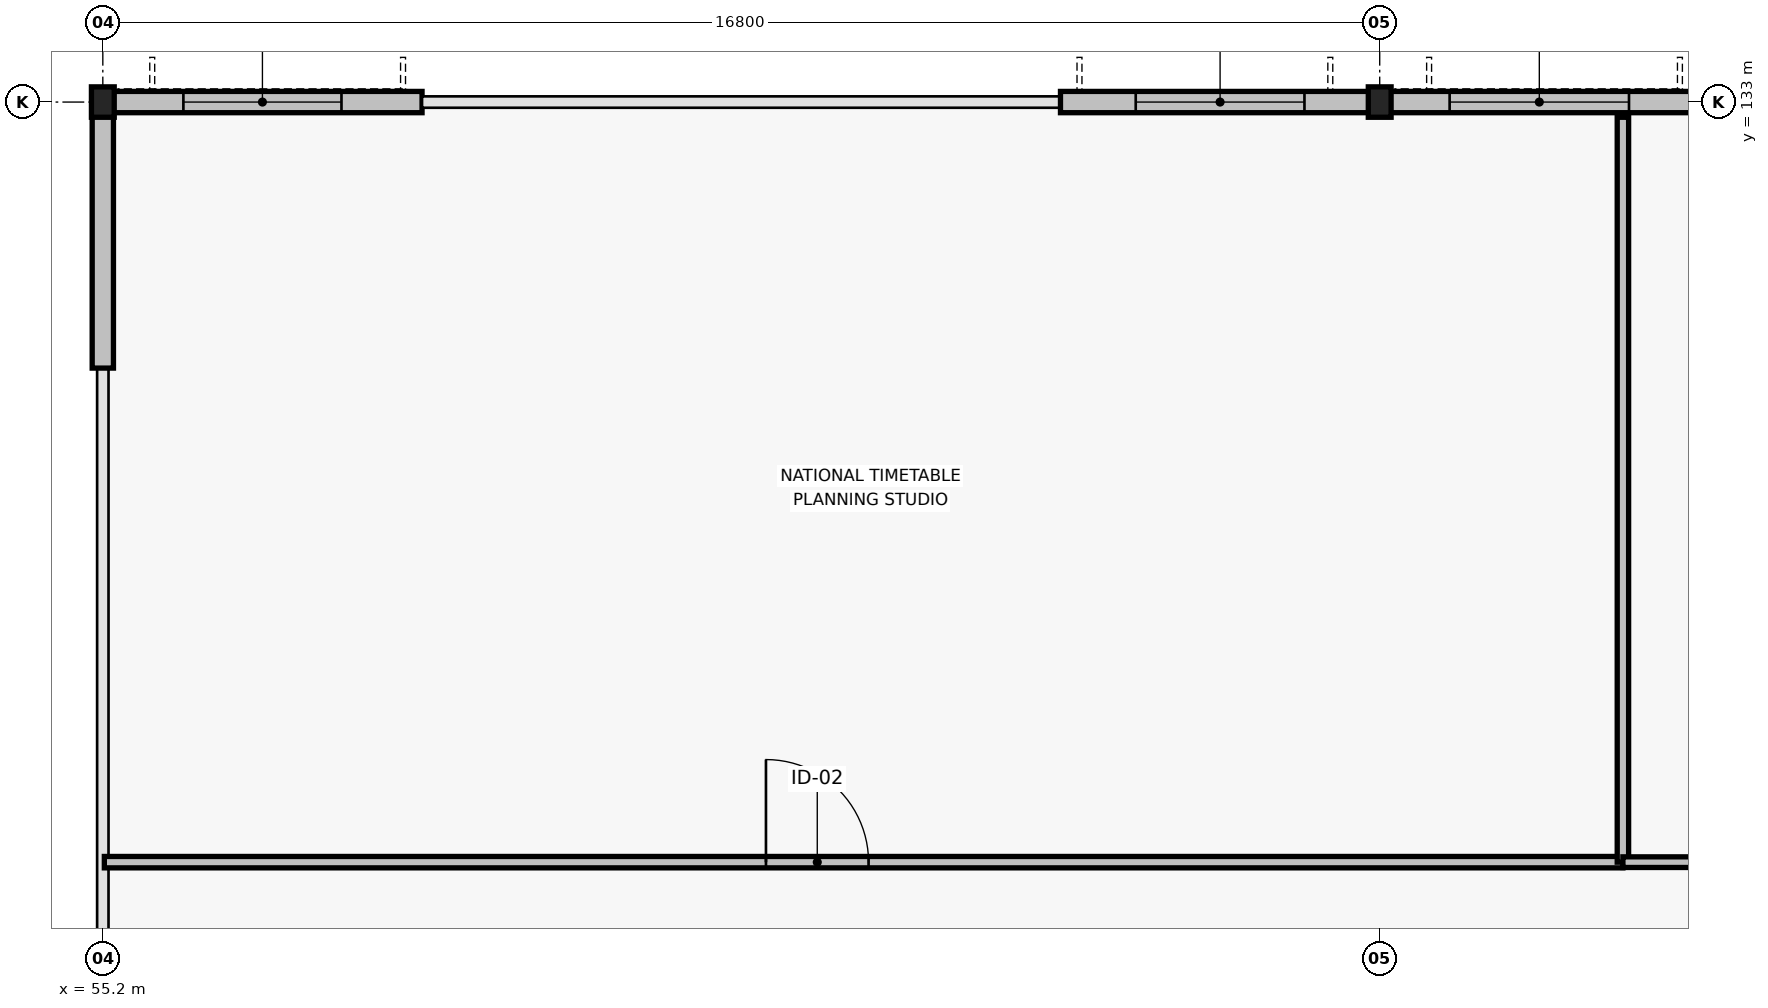
"""IFC4 building model, lengths in metres.
Left out: names, types, materials, properties, quantities, classifications, styles, units other than length and angle.
Written with IfcOpenShell. Run it as: python <this file> out.ifc"""

import sys

from ifc_helpers import new_model, si_unit, direction, frame, frame_2d, origin, origin_2d, place, context, subcontext, project, spatial, rectangle, i_section, extrude, element, fill, save


model = new_model("IFC4")
c1 = context("Model", 3, precision=1e-05, world=origin(), true_north=direction((0.0, 1.0)))
c2 = subcontext(c1, "Body", "Model", "MODEL_VIEW")
j1 = project(units=[si_unit("LENGTHUNIT", "METRE"), si_unit("PLANEANGLEUNIT", "RADIAN")], contexts=[c1])
p1 = place(None, origin())
s1 = spatial("IfcSite", under=j1, at=p1, CompositionType="ELEMENT")
p2 = place(p1, origin())
s2 = spatial("IfcBuilding", under=s1, at=p2, CompositionType="ELEMENT")
p3 = place(p2, frame((0.0, 0.0, 21.0)))
s3 = spatial("IfcBuildingStorey", under=s2, at=p3, CompositionType="ELEMENT", Elevation=21.0)
for number, where, z_axis, x_axis in (
    (1, (55.2, 133.0, 0.0), (0.0, 0.0, 1.0), (1.0, 0.0, 0.0)),
    (2, (72.0, 133.0, 0.0), (0.0, 0.0, 1.0), (1.0, 0.0, 0.0)),
):
    element("IfcColumn", number, at=place(p3, frame(where, z_axis=z_axis, x_axis=x_axis)), inside=s3, PredefinedType="COLUMN", context=c2, shape_type="SweptSolid", body=[
        extrude(i_section(OverallWidth=0.3, OverallDepth=0.4, WebThickness=0.013, FlangeThickness=0.024, FilletRadius=0.027, at=origin_2d()), origin(), (0.0, 0.0, 1.0), 3.9),
    ])
p4 = place(p3, frame((55.2, 133.0, 0.0), z_axis=(0.0, 0.0, 1.0), x_axis=(1.0, 0.0, 0.0)))
e3 = element("IfcWall", 3, at=p4, inside=s3, PredefinedType="STANDARD", context=c2, shape_type="SweptSolid", body=[
    extrude(rectangle(XDim=4.2, YDim=0.28, at=frame_2d((2.1, 0.0))), origin(), (0.0, 0.0, 1.0), 3.105),
])
p5 = place(p4, frame((1.06, 0.0, 0.8)))
e4 = element("IfcOpeningElement", 4, at=p5, cuts=e3, PredefinedType="OPENING", context=c2, shape_type="SweptSolid", body=[
    extrude(rectangle(XDim=2.08, YDim=1.59, at=frame_2d((1.04, 0.795))), frame((0.0, 0.15, 0.0), z_axis=(0.0, -1.0, 0.0), x_axis=(1.0, 0.0, 0.0)), (0.0, 0.0, 1.0), 0.3),
])
p6 = place(p3, frame((67.8, 133.0, 0.0), z_axis=(0.0, 0.0, 1.0), x_axis=(1.0, 0.0, 0.0)))
e5 = element("IfcWall", 5, at=p6, inside=s3, PredefinedType="STANDARD", context=c2, shape_type="SweptSolid", body=[
    extrude(rectangle(XDim=4.2, YDim=0.28, at=frame_2d((2.1, 0.0))), origin(), (0.0, 0.0, 1.0), 3.105),
])
p7 = place(p6, frame((0.99, 0.0, 0.8)))
e6 = element("IfcOpeningElement", 6, at=p7, cuts=e5, PredefinedType="OPENING", context=c2, shape_type="SweptSolid", body=[
    extrude(rectangle(XDim=2.22, YDim=1.47, at=frame_2d((1.11, 0.735))), frame((0.0, 0.15, 0.0), z_axis=(0.0, -1.0, 0.0), x_axis=(1.0, 0.0, 0.0)), (0.0, 0.0, 1.0), 0.3),
])
p8 = place(p3, frame((72.0, 133.0, 0.0), z_axis=(0.0, 0.0, 1.0), x_axis=(1.0, 0.0, 0.0)))
e7 = element("IfcWall", 7, at=p8, inside=s3, PredefinedType="STANDARD", context=c2, shape_type="SweptSolid", body=[
    extrude(rectangle(XDim=4.2, YDim=0.28, at=frame_2d((2.1, 0.0))), origin(), (0.0, 0.0, 1.0), 3.315),
])
p9 = place(p8, frame((0.92, 0.0, 0.8)))
e8 = element("IfcOpeningElement", 8, at=p9, cuts=e7, PredefinedType="OPENING", context=c2, shape_type="SweptSolid", body=[
    extrude(rectangle(XDim=2.36, YDim=1.53, at=frame_2d((1.18, 0.765))), frame((0.0, 0.15, 0.0), z_axis=(0.0, -1.0, 0.0), x_axis=(1.0, 0.0, 0.0)), (0.0, 0.0, 1.0), 0.3),
])
p10 = place(p3, frame((55.2, 129.5, 0.0), z_axis=(0.0, 0.0, 1.0), x_axis=(0.0, 1.0, 0.0)))
e9 = element("IfcWall", 9, at=p10, inside=s3, PredefinedType="STANDARD", context=c2, shape_type="SweptSolid", body=[
    extrude(rectangle(XDim=3.36, YDim=0.28, at=frame_2d((1.68, 0.0))), origin(), (0.0, 0.0, 1.0), 3.205),
])
p11 = place(p3, frame((55.22, 123.0, 0.0), z_axis=(0.0, 0.0, 1.0), x_axis=(1.0, 0.0, 0.0)))
e10 = element("IfcWall", 10, at=p11, inside=s3, PredefinedType="PARTITIONING", context=c2, shape_type="SweptSolid", body=[
    extrude(rectangle(XDim=19.98, YDim=0.15, at=frame_2d((9.99, 0.0))), origin(), (0.0, 0.0, 1.0), 3.71),
])
p12 = place(p11, frame((8.705, 0.0, 0.0)))
e11 = element("IfcOpeningElement", 11, at=p12, cuts=e10, PredefinedType="OPENING", context=c2, shape_type="SweptSolid", body=[
    extrude(rectangle(XDim=1.35, YDim=2.2, at=frame_2d((0.675, 1.1))), frame((0.0, 0.085, 0.0), z_axis=(0.0, -1.0, 0.0), x_axis=(1.0, 0.0, 0.0)), (0.0, 0.0, 1.0), 0.17),
])
p13 = place(p3, frame((75.2, 123.0, 0.0), z_axis=(0.0, 0.0, 1.0), x_axis=(0.0, 1.0, 0.0)))
e12 = element("IfcWall", 12, at=p13, inside=s3, PredefinedType="PARTITIONING", context=c2, shape_type="SweptSolid", body=[
    extrude(rectangle(XDim=9.8, YDim=0.15, at=frame_2d((4.9, 0.0))), origin(), (0.0, 0.0, 1.0), 3.71),
])
p14 = place(p3, frame((75.2, 123.0, 0.0), z_axis=(0.0, 0.0, 1.0), x_axis=(1.0, 0.0, 0.0)))
e13 = element("IfcWall", 13, at=p14, inside=s3, PredefinedType="PARTITIONING", context=c2, shape_type="SweptSolid", body=[
    extrude(rectangle(XDim=20.6, YDim=0.14, at=frame_2d((10.3, 0.0))), origin(), (0.0, 0.0, 1.0), 3.71),
])
p15 = place(p14, frame((8.2, 0.0, 0.0)))
e14 = element("IfcOpeningElement", 14, at=p15, cuts=e13, PredefinedType="OPENING", context=c2, shape_type="SweptSolid", body=[
    extrude(rectangle(XDim=1.2, YDim=2.2, at=frame_2d((0.6, 1.1))), frame((0.0, 0.08, 0.0), z_axis=(0.0, -1.0, 0.0), x_axis=(1.0, 0.0, 0.0)), (0.0, 0.0, 1.0), 0.16),
])
p16 = place(p5, origin())
e15 = element("IfcWindow", 15, at=p16, inside=s3, PartitioningType="SINGLE_PANEL", PredefinedType="WINDOW", context=c2, shape_type="SweptSolid", body=[
    extrude(rectangle(XDim=2.08, YDim=1.59, at=frame_2d((1.04, 0.795))), frame((0.0, 0.03, 0.0), z_axis=(0.0, -1.0, 0.0), x_axis=(1.0, 0.0, 0.0)), (0.0, 0.0, 1.0), 0.06),
])
fill(e4, e15)
p17 = place(p7, origin())
e16 = element("IfcWindow", 16, at=p17, inside=s3, PartitioningType="SINGLE_PANEL", PredefinedType="WINDOW", context=c2, shape_type="SweptSolid", body=[
    extrude(rectangle(XDim=2.22, YDim=1.47, at=frame_2d((1.11, 0.735))), frame((0.0, 0.03, 0.0), z_axis=(0.0, -1.0, 0.0), x_axis=(1.0, 0.0, 0.0)), (0.0, 0.0, 1.0), 0.06),
])
fill(e6, e16)
p18 = place(p9, origin())
e17 = element("IfcWindow", 17, at=p18, inside=s3, PartitioningType="SINGLE_PANEL", PredefinedType="WINDOW", context=c2, shape_type="SweptSolid", body=[
    extrude(rectangle(XDim=2.36, YDim=1.53, at=frame_2d((1.18, 0.765))), frame((0.0, 0.03, 0.0), z_axis=(0.0, -1.0, 0.0), x_axis=(1.0, 0.0, 0.0)), (0.0, 0.0, 1.0), 0.06),
])
fill(e8, e17)
p19 = place(p12, origin())
e18 = element("IfcDoor", 18, at=p19, inside=s3, OperationType="SINGLE_SWING_LEFT", PredefinedType="DOOR", context=c2, shape_type="SweptSolid", body=[
    extrude(rectangle(XDim=1.35, YDim=2.2, at=frame_2d((0.675, 1.1))), frame((0.0, 0.025, 0.0), z_axis=(0.0, -1.0, 0.0), x_axis=(1.0, 0.0, 0.0)), (0.0, 0.0, 1.0), 0.05),
])
fill(e11, e18)
save(model, sys.argv[1])
